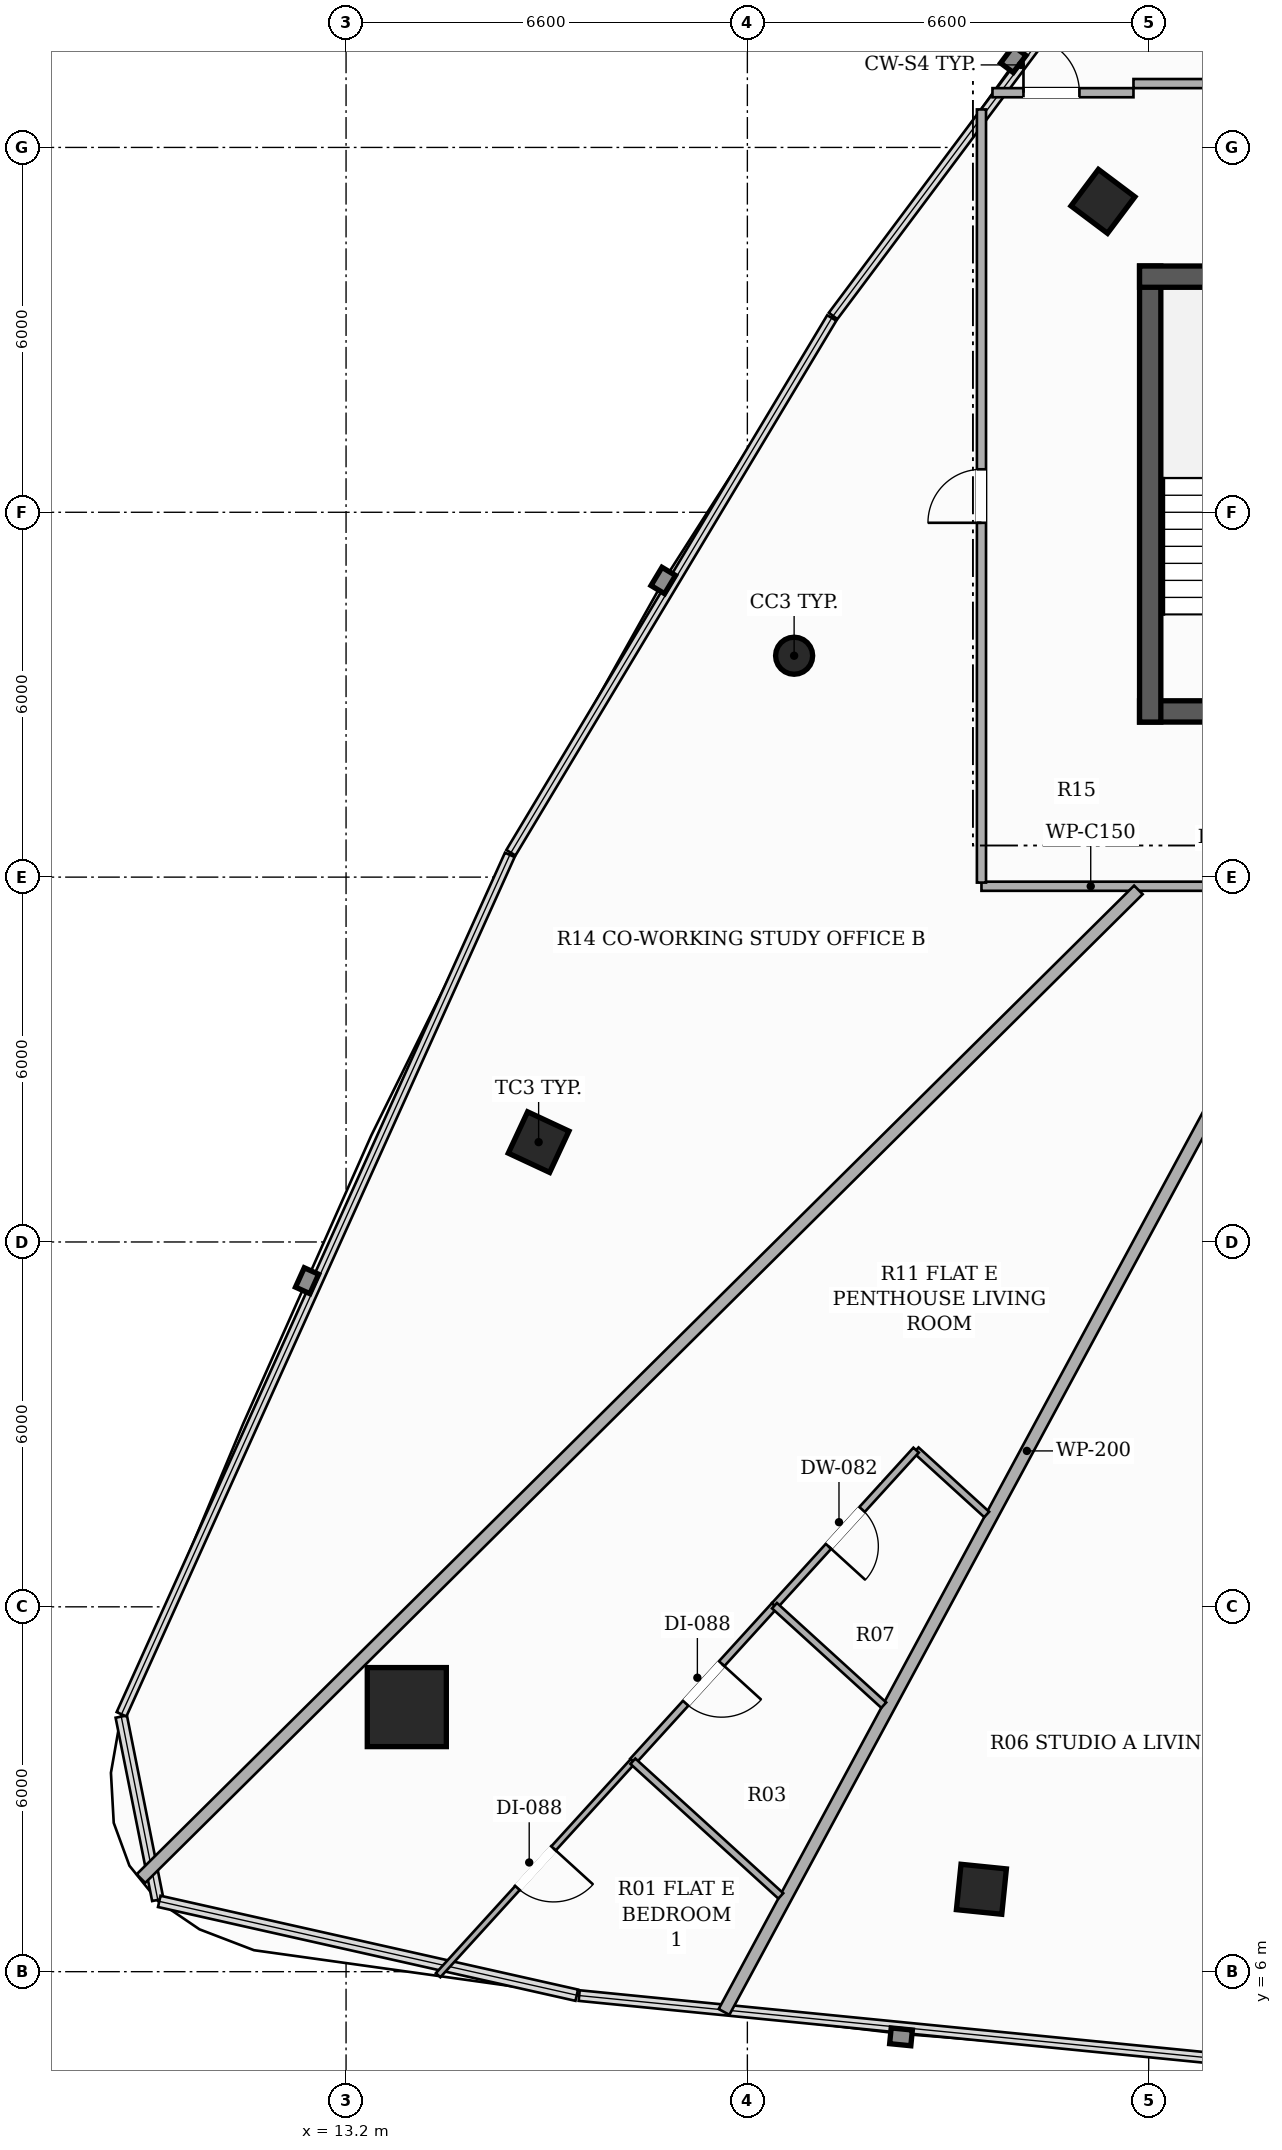
"""IFC4 building model, lengths in metres.
Left out: names, types, materials, properties, quantities, classifications, styles, units other than length and angle.
Written with IfcOpenShell. Run it as: python <this file> out.ifc"""

import sys

from ifc_helpers import new_model, si_unit, direction, frame, frame_2d, origin, origin_2d, place, context, subcontext, project, spatial, rectangle, hollow_rectangle, hollow_circle, extrude, element, fill, save


model = new_model("IFC4")
c1 = context("Model", 3, precision=1e-05, world=origin(), true_north=direction((0.0, 1.0)))
c2 = subcontext(c1, "Body", "Model", "MODEL_VIEW")
j1 = project(units=[si_unit("LENGTHUNIT", "METRE"), si_unit("PLANEANGLEUNIT", "RADIAN")], contexts=[c1])
p1 = place(None, origin())
s1 = spatial("IfcSite", under=j1, at=p1, CompositionType="ELEMENT")
p2 = place(p1, origin())
s2 = spatial("IfcBuilding", under=s1, at=p2, CompositionType="ELEMENT")
p3 = place(p2, frame((0.0, 0.0, 203.0)))
s3 = spatial("IfcBuildingStorey", under=s2, at=p3, CompositionType="ELEMENT", Elevation=203.0)
p4 = place(p3, frame((26.25, 26.725, 0.0), z_axis=(0.0, 0.0, 1.0), x_axis=(1.0, 0.0, 0.0)))
e1 = element("IfcWall", 1, at=p4, inside=s3, PredefinedType="SHEAR", context=c2, shape_type="SweptSolid", body=[
    extrude(rectangle(XDim=13.5, YDim=0.35, at=frame_2d((6.75, 0.0))), origin(), (0.0, 0.0, 1.0), 3.3),
])
p5 = place(p4, frame((4.35, 0.0, 0.0)))
e2 = element("IfcOpeningElement", 2, at=p5, cuts=e1, PredefinedType="OPENING", context=c2, shape_type="SweptSolid", body=[
    extrude(rectangle(XDim=1.05, YDim=2.15, at=frame_2d((0.525, 1.075))), frame((0.0, 0.185, 0.0), z_axis=(0.0, -1.0, 0.0), x_axis=(1.0, 0.0, 0.0)), (0.0, 0.0, 1.0), 0.37),
])
p6 = place(p4, frame((8.3, 0.0, 0.0)))
e3 = element("IfcOpeningElement", 3, at=p6, cuts=e1, PredefinedType="OPENING", context=c2, shape_type="SweptSolid", body=[
    extrude(rectangle(XDim=1.05, YDim=2.15, at=frame_2d((0.525, 1.075))), frame((0.0, 0.185, 0.0), z_axis=(0.0, -1.0, 0.0), x_axis=(1.0, 0.0, 0.0)), (0.0, 0.0, 1.0), 0.37),
])
p7 = place(p3, frame((26.425, 26.55, 0.0), z_axis=(0.0, 0.0, 1.0), x_axis=(0.0, 1.0, 0.0)))
e4 = element("IfcWall", 4, at=p7, inside=s3, PredefinedType="SHEAR", context=c2, shape_type="SweptSolid", body=[
    extrude(rectangle(XDim=7.5, YDim=0.35, at=frame_2d((3.75, 0.0))), origin(), (0.0, 0.0, 1.0), 3.3),
])
p8 = place(p3, frame((26.25, 33.875, 0.0), z_axis=(0.0, 0.0, 1.0), x_axis=(1.0, 0.0, 0.0)))
e5 = element("IfcWall", 5, at=p8, inside=s3, PredefinedType="SHEAR", context=c2, shape_type="SweptSolid", body=[
    extrude(rectangle(XDim=3.6, YDim=0.35, at=frame_2d((1.8, 0.0))), origin(), (0.0, 0.0, 1.0), 3.3),
])
p9 = place(p3, frame((14.199, 10.351, 0.0), z_axis=(0.0, 0.0, 1.0), x_axis=(1.0, 0.0, 0.0)))
e6 = element("IfcColumn", 6, at=p9, inside=s3, PredefinedType="COLUMN", context=c2, shape_type="SweptSolid", body=[
    extrude(hollow_rectangle(XDim=1.3, YDim=1.3, WallThickness=0.04, at=origin_2d()), origin(), (0.0, 0.0, 1.0), 3.3),
])
p10 = place(p3, frame((25.648, 35.113, 0.0), z_axis=(0.0, 0.0, 1.0), x_axis=(0.600420225326, 0.799684658487, 0.0)))
e7 = element("IfcColumn", 7, at=p10, inside=s3, PredefinedType="COLUMN", context=c2, shape_type="SweptSolid", body=[
    extrude(hollow_rectangle(XDim=0.75, YDim=0.75, WallThickness=0.025, at=origin_2d()), origin(), (0.0, 0.0, 1.0), 3.3),
])
p11 = place(p3, frame((20.569, 27.641, 0.0), z_axis=(0.0, 0.0, 1.0), x_axis=(1.0, 0.0, 0.0)))
e8 = element("IfcColumn", 8, at=p11, inside=s3, PredefinedType="COLUMN", context=c2, shape_type="SweptSolid", body=[
    extrude(hollow_circle(Radius=0.305, WallThickness=0.016, at=origin_2d()), origin(), (0.0, 0.0, 1.0), 3.3),
])
for number, where, z_axis, x_axis in (
    (9, (16.367, 19.642, 0.0), (0.0, 0.0, 1.0), (0.423, 0.906, 0.0)),
    (10, (23.649, 7.355, 0.0), (0.0, 0.0, 1.0), (-0.995, 0.101, 0.0)),
):
    element("IfcColumn", number, at=place(p3, frame(where, z_axis=z_axis, x_axis=x_axis)), inside=s3, PredefinedType="COLUMN", context=c2, shape_type="SweptSolid", body=[
        extrude(hollow_rectangle(XDim=0.75, YDim=0.75, WallThickness=0.025, at=origin_2d()), origin(), (0.0, 0.0, 1.0), 3.3),
    ])
p12 = place(p3, frame((32.027, 23.85, 0.0), z_axis=(0.0, 0.0, 1.0), x_axis=(-1.0, 0.0, 0.0)))
e11 = element("IfcWall", 11, at=p12, inside=s3, PredefinedType="PARTITIONING", context=c2, shape_type="SweptSolid", body=[
    extrude(rectangle(XDim=8.377, YDim=0.15, at=frame_2d((4.188, 0.0))), origin(), (0.0, 0.0, 1.0), 2.565),
])
p13 = place(p12, frame((1.014, 0.0, 0.0)))
e12 = element("IfcOpeningElement", 12, at=p13, cuts=e11, PredefinedType="OPENING", context=c2, shape_type="SweptSolid", body=[
    extrude(rectangle(XDim=0.92, YDim=2.15, at=frame_2d((0.46, 1.075))), frame((0.0, 0.085, 0.0), z_axis=(0.0, -1.0, 0.0), x_axis=(1.0, 0.0, 0.0)), (0.0, 0.0, 1.0), 0.17),
])
p14 = place(p12, frame((3.763, 0.0, 0.0)))
e13 = element("IfcOpeningElement", 13, at=p14, cuts=e11, PredefinedType="OPENING", context=c2, shape_type="SweptSolid", body=[
    extrude(rectangle(XDim=0.92, YDim=2.15, at=frame_2d((0.46, 1.075))), frame((0.0, 0.085, 0.0), z_axis=(0.0, -1.0, 0.0), x_axis=(1.0, 0.0, 0.0)), (0.0, 0.0, 1.0), 0.17),
])
p15 = place(p3, frame((23.65, 23.91, 0.0), z_axis=(0.0, 0.0, 1.0), x_axis=(0.0, 1.0, 0.0)))
e14 = element("IfcWall", 14, at=p15, inside=s3, PredefinedType="PARTITIONING", context=c2, shape_type="SweptSolid", body=[
    extrude(rectangle(XDim=12.715, YDim=0.15, at=frame_2d((6.357, 0.0))), origin(), (0.0, 0.0, 1.0), 2.492),
])
p16 = place(p15, frame((5.917, 0.0, 0.0)))
e15 = element("IfcOpeningElement", 15, at=p16, cuts=e14, PredefinedType="OPENING", context=c2, shape_type="SweptSolid", body=[
    extrude(rectangle(XDim=0.88, YDim=2.1, at=frame_2d((0.44, 1.05))), frame((0.0, 0.085, 0.0), z_axis=(0.0, -1.0, 0.0), x_axis=(1.0, 0.0, 0.0)), (0.0, 0.0, 1.0), 0.17),
])
p17 = place(p3, frame((23.831, 36.9, 0.0), z_axis=(0.0, 0.0, 1.0), x_axis=(1.0, 0.0, 0.0)))
e16 = element("IfcWall", 16, at=p17, inside=s3, PredefinedType="PARTITIONING", context=c2, shape_type="SweptSolid", body=[
    extrude(rectangle(XDim=2.319, YDim=0.15, at=frame_2d((1.159, 0.0))), origin(), (0.0, 0.0, 1.0), 2.619),
])
p18 = place(p17, frame((0.51, 0.0, 0.0)))
e17 = element("IfcOpeningElement", 17, at=p18, cuts=e16, PredefinedType="OPENING", context=c2, shape_type="SweptSolid", body=[
    extrude(rectangle(XDim=0.92, YDim=2.15, at=frame_2d((0.46, 1.075))), frame((0.0, 0.085, 0.0), z_axis=(0.0, -1.0, 0.0), x_axis=(1.0, 0.0, 0.0)), (0.0, 0.0, 1.0), 0.17),
])
p19 = place(p3, frame((26.15, 37.05, 0.0), z_axis=(0.0, 0.0, 1.0), x_axis=(1.0, 0.0, 0.0)))
e18 = element("IfcWall", 18, at=p19, inside=s3, PredefinedType="PARTITIONING", context=c2, shape_type="SweptSolid", body=[
    extrude(rectangle(XDim=4.3, YDim=0.15, at=frame_2d((2.15, 0.0))), origin(), (0.0, 0.0, 1.0), 2.425),
])
p20 = place(p3, frame((19.416, 5.338, 0.0), z_axis=(0.0, 0.0, 1.0), x_axis=(0.475065982754, 0.879950175879, 0.0)))
e19 = element("IfcWall", 19, at=p20, inside=s3, PredefinedType="PARTITIONING", context=c2, shape_type="SweptSolid", body=[
    extrude(rectangle(XDim=20.969, YDim=0.2, at=frame_2d((10.485, 0.0))), origin(), (0.0, 0.0, 1.0), 2.492),
])
p21 = place(p3, frame((26.231, 23.79, 0.0), z_axis=(0.0, 0.0, 1.0), x_axis=(-0.710239236144, -0.703960387693, 0.0)))
e20 = element("IfcWall", 20, at=p21, inside=s3, PredefinedType="PARTITIONING", context=c2, shape_type="SweptSolid", body=[
    extrude(rectangle(XDim=23.096, YDim=0.2, at=frame_2d((11.548, 0.0))), origin(), (0.0, 0.0, 1.0), 2.492),
])
p22 = place(p3, frame((23.736, 13.519, 0.0), z_axis=(0.0, 0.0, 1.0), x_axis=(-0.739215251716, 0.673469235846, 0.0)))
e21 = element("IfcWall", 21, at=p22, inside=s3, PredefinedType="PARTITIONING", context=c2, shape_type="SweptSolid", body=[
    extrude(rectangle(XDim=1.571, YDim=0.12, at=frame_2d((0.785, 0.0))), origin(), (0.0, 0.0, 1.0), 3.06),
])
p23 = place(p3, frame((22.575, 14.577, 0.0), z_axis=(0.0, 0.0, 1.0), x_axis=(-0.673231148277, -0.739432093563, 0.0)))
e22 = element("IfcWall", 22, at=p23, inside=s3, PredefinedType="PARTITIONING", context=c2, shape_type="SweptSolid", body=[
    extrude(rectangle(XDim=3.459, YDim=0.12, at=frame_2d((1.729, 0.0))), origin(), (0.0, 0.0, 1.0), 2.773),
])
p24 = place(p23, frame((1.32, 0.0, 0.0)))
e23 = element("IfcOpeningElement", 23, at=p24, cuts=e22, PredefinedType="OPENING", context=c2, shape_type="SweptSolid", body=[
    extrude(rectangle(XDim=0.82, YDim=2.1, at=frame_2d((0.41, 1.05))), frame((0.0, 0.07, 0.0), z_axis=(0.0, -1.0, 0.0), x_axis=(1.0, 0.0, 0.0)), (0.0, 0.0, 1.0), 0.14),
])
p25 = place(p3, frame((20.246, 12.019, 0.0), z_axis=(0.0, 0.0, 1.0), x_axis=(-0.673234602732, -0.739428948368, 0.0)))
e24 = element("IfcWall", 24, at=p25, inside=s3, PredefinedType="PARTITIONING", context=c2, shape_type="SweptSolid", body=[
    extrude(rectangle(XDim=3.459, YDim=0.12, at=frame_2d((1.73, 0.0))), origin(), (0.0, 0.0, 1.0), 2.492),
])
p26 = place(p25, frame((1.29, 0.0, 0.0)))
e25 = element("IfcOpeningElement", 25, at=p26, cuts=e24, PredefinedType="OPENING", context=c2, shape_type="SweptSolid", body=[
    extrude(rectangle(XDim=0.88, YDim=2.1, at=frame_2d((0.44, 1.05))), frame((0.0, 0.07, 0.0), z_axis=(0.0, -1.0, 0.0), x_axis=(1.0, 0.0, 0.0)), (0.0, 0.0, 1.0), 0.14),
])
p27 = place(p3, frame((17.917, 9.461, 0.0), z_axis=(0.0, 0.0, 1.0), x_axis=(-0.673104266943, -0.739547595374, 0.0)))
e26 = element("IfcWall", 26, at=p27, inside=s3, PredefinedType="PARTITIONING", context=c2, shape_type="SweptSolid", body=[
    extrude(rectangle(XDim=4.758, YDim=0.1, at=frame_2d((2.379, 0.0))), origin(), (0.0, 0.0, 1.0), 2.492),
])
p28 = place(p27, frame((1.939, 0.0, 0.0)))
e27 = element("IfcOpeningElement", 27, at=p28, cuts=e26, PredefinedType="OPENING", context=c2, shape_type="SweptSolid", body=[
    extrude(rectangle(XDim=0.88, YDim=2.1, at=frame_2d((0.44, 1.05))), frame((0.0, 0.06, 0.0), z_axis=(0.0, -1.0, 0.0), x_axis=(1.0, 0.0, 0.0)), (0.0, 0.0, 1.0), 0.12),
])
p29 = place(p3, frame((22.043, 10.383, 0.0), z_axis=(0.0, 0.0, 1.0), x_axis=(-0.739435258465, 0.673227672143, 0.0)))
e28 = element("IfcWall", 28, at=p29, inside=s3, PredefinedType="PARTITIONING", context=c2, shape_type="SweptSolid", body=[
    extrude(rectangle(XDim=2.43, YDim=0.12, at=frame_2d((1.215, 0.0))), origin(), (0.0, 0.0, 1.0), 2.773),
])
p30 = place(p3, frame((20.35, 7.246, 0.0), z_axis=(0.0, 0.0, 1.0), x_axis=(-0.739496715577, 0.673160164932, 0.0)))
e29 = element("IfcWall", 29, at=p30, inside=s3, PredefinedType="PARTITIONING", context=c2, shape_type="SweptSolid", body=[
    extrude(rectangle(XDim=3.29, YDim=0.12, at=frame_2d((1.645, 0.0))), origin(), (0.0, 0.0, 1.0), 2.492),
])
p31 = place(p16, origin())
e30 = element("IfcDoor", 30, at=p31, inside=s3, OperationType="SINGLE_SWING_LEFT", PredefinedType="DOOR", context=c2, shape_type="SweptSolid", body=[
    extrude(rectangle(XDim=0.88, YDim=2.1, at=frame_2d((0.44, 1.05))), frame((0.0, 0.025, 0.0), z_axis=(0.0, -1.0, 0.0), x_axis=(1.0, 0.0, 0.0)), (0.0, 0.0, 1.0), 0.05),
])
fill(e15, e30)
p32 = place(p24, origin())
e31 = element("IfcDoor", 31, at=p32, inside=s3, OperationType="SINGLE_SWING_RIGHT", PredefinedType="DOOR", context=c2, shape_type="SweptSolid", body=[
    extrude(rectangle(XDim=0.82, YDim=2.1, at=frame_2d((0.41, 1.05))), frame((0.0, 0.025, 0.0), z_axis=(0.0, -1.0, 0.0), x_axis=(1.0, 0.0, 0.0)), (0.0, 0.0, 1.0), 0.05),
])
fill(e23, e31)
p33 = place(p26, origin())
e32 = element("IfcDoor", 32, at=p33, inside=s3, OperationType="SINGLE_SWING_LEFT", PredefinedType="DOOR", context=c2, shape_type="SweptSolid", body=[
    extrude(rectangle(XDim=0.88, YDim=2.1, at=frame_2d((0.44, 1.05))), frame((0.0, 0.025, 0.0), z_axis=(0.0, -1.0, 0.0), x_axis=(1.0, 0.0, 0.0)), (0.0, 0.0, 1.0), 0.05),
])
fill(e25, e32)
p34 = place(p28, origin())
e33 = element("IfcDoor", 33, at=p34, inside=s3, OperationType="SINGLE_SWING_LEFT", PredefinedType="DOOR", context=c2, shape_type="SweptSolid", body=[
    extrude(rectangle(XDim=0.88, YDim=2.1, at=frame_2d((0.44, 1.05))), frame((0.0, 0.025, 0.0), z_axis=(0.0, -1.0, 0.0), x_axis=(1.0, 0.0, 0.0)), (0.0, 0.0, 1.0), 0.05),
])
fill(e27, e33)
p35 = place(p18, origin())
e34 = element("IfcDoor", 34, at=p35, inside=s3, OperationType="SINGLE_SWING_LEFT", PredefinedType="DOOR", context=c2, shape_type="SweptSolid", body=[
    extrude(rectangle(XDim=0.92, YDim=2.15, at=frame_2d((0.46, 1.075))), frame((0.0, 0.025, 0.0), z_axis=(0.0, -1.0, 0.0), x_axis=(1.0, 0.0, 0.0)), (0.0, 0.0, 1.0), 0.05),
])
fill(e17, e34)
save(model, sys.argv[1])
